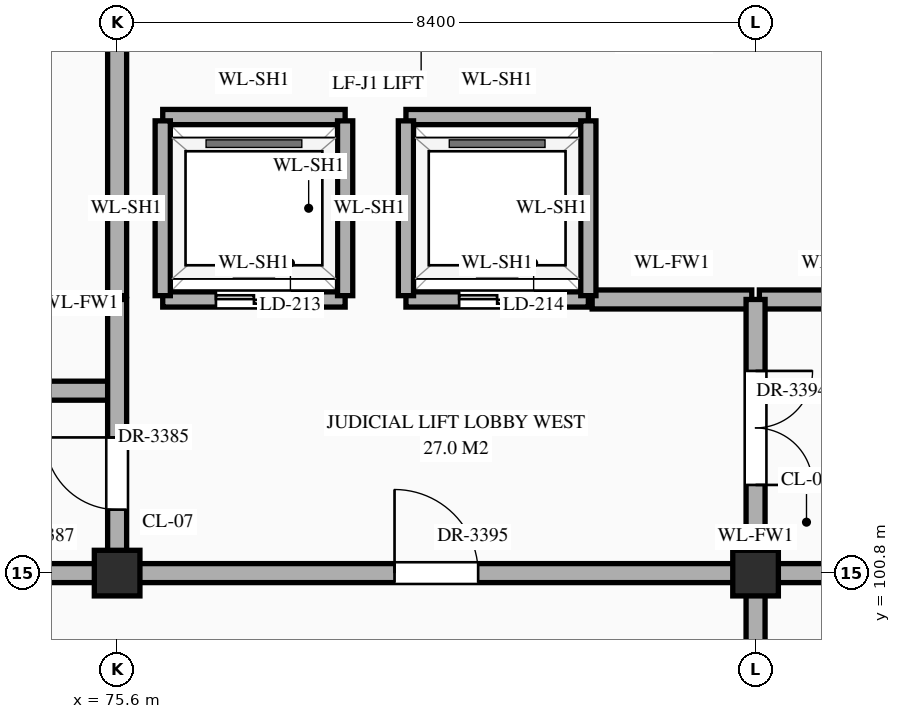
"""IFC4 building model, lengths in metres.
Left out: names, types, materials, properties, quantities, classifications, styles, units other than length and angle.
Written with IfcOpenShell. Run it as: python <this file> out.ifc"""

import sys

from ifc_helpers import new_model, si_unit, direction, frame, frame_2d, origin, origin_2d, place, context, subcontext, project, spatial, rectangle, extrude, element, fill, save


model = new_model("IFC4")
c1 = context("Model", 3, precision=1e-05, world=origin(), true_north=direction((0.0, 1.0)))
c2 = subcontext(c1, "Body", "Model", "MODEL_VIEW")
j1 = project(units=[si_unit("LENGTHUNIT", "METRE"), si_unit("PLANEANGLEUNIT", "RADIAN")], contexts=[c1])
p1 = place(None, origin())
s1 = spatial("IfcSite", under=j1, at=p1, CompositionType="ELEMENT")
p2 = place(p1, origin())
s2 = spatial("IfcBuilding", under=s1, at=p2, CompositionType="ELEMENT")
p3 = place(p2, frame((0.0, 0.0, 68.7)))
s3 = spatial("IfcBuildingStorey", under=s2, at=p3, CompositionType="ELEMENT", Elevation=68.7)
for number, where, z_axis, x_axis in (
    (1, (75.6, 100.8, 0.0), (0.0, 0.0, 1.0), (1.0, 0.0, 0.0)),
    (2, (84.0, 100.8, 0.0), (0.0, 0.0, 1.0), (1.0, 0.0, 0.0)),
):
    element("IfcColumn", number, at=place(p3, frame(where, z_axis=z_axis, x_axis=x_axis)), inside=s3, PredefinedType="COLUMN", context=c2, shape_type="SweptSolid", body=[
        extrude(rectangle(XDim=0.6, YDim=0.6, at=origin_2d()), origin(), (0.0, 0.0, 1.0), 4.5),
    ])
p4 = place(p3, frame((72.8, 100.8, 0.0), z_axis=(0.0, 0.0, 1.0), x_axis=(1.0, 0.0, 0.0)))
e3 = element("IfcWall", 3, at=p4, inside=s3, PredefinedType="STANDARD", context=c2, shape_type="SweptSolid", body=[
    extrude(rectangle(XDim=22.4, YDim=0.25, at=frame_2d((11.2, 0.0))), origin(), (0.0, 0.0, 1.0), 3.27),
])
p5 = place(p4, frame((0.79, 0.0, 0.0)))
e4 = element("IfcOpeningElement", 4, at=p5, cuts=e3, PredefinedType="OPENING", context=c2, shape_type="SweptSolid", body=[
    extrude(rectangle(XDim=1.0, YDim=2.2, at=frame_2d((0.5, 1.1))), frame((0.0, 0.137, 0.0), z_axis=(0.0, -1.0, 0.0), x_axis=(1.0, 0.0, 0.0)), (0.0, 0.0, 1.0), 0.274),
])
p6 = place(p4, frame((20.635, 0.0, 0.0)))
e5 = element("IfcOpeningElement", 5, at=p6, cuts=e3, PredefinedType="OPENING", context=c2, shape_type="SweptSolid", body=[
    extrude(rectangle(XDim=0.95, YDim=2.15, at=frame_2d((0.475, 1.075))), frame((0.0, 0.137, 0.0), z_axis=(0.0, -1.0, 0.0), x_axis=(1.0, 0.0, 0.0)), (0.0, 0.0, 1.0), 0.274),
])
p7 = place(p4, frame((6.45, 0.0, 0.0)))
e6 = element("IfcOpeningElement", 6, at=p7, cuts=e3, PredefinedType="OPENING", context=c2, shape_type="SweptSolid", body=[
    extrude(rectangle(XDim=1.1, YDim=2.2, at=frame_2d((0.55, 1.1))), frame((0.0, 0.137, 0.0), z_axis=(0.0, -1.0, 0.0), x_axis=(1.0, 0.0, 0.0)), (0.0, 0.0, 1.0), 0.274),
])
p8 = place(p4, frame((14.9, 0.0, 0.0)))
e7 = element("IfcOpeningElement", 7, at=p8, cuts=e3, PredefinedType="OPENING", context=c2, shape_type="SweptSolid", body=[
    extrude(rectangle(XDim=1.0, YDim=2.2, at=frame_2d((0.5, 1.1))), frame((0.0, 0.137, 0.0), z_axis=(0.0, -1.0, 0.0), x_axis=(1.0, 0.0, 0.0)), (0.0, 0.0, 1.0), 0.274),
])
p9 = place(p3, frame((71.4, 103.2, 0.0), z_axis=(0.0, 0.0, 1.0), x_axis=(1.0, 0.0, 0.0)))
e8 = element("IfcWall", 8, at=p9, inside=s3, PredefinedType="STANDARD", context=c2, shape_type="SweptSolid", body=[
    extrude(rectangle(XDim=4.2, YDim=0.25, at=frame_2d((2.1, 0.0))), origin(), (0.0, 0.0, 1.0), 4.12),
])
p10 = place(p9, frame((1.6, 0.0, 0.0)))
e9 = element("IfcOpeningElement", 9, at=p10, cuts=e8, PredefinedType="OPENING", context=c2, shape_type="SweptSolid", body=[
    extrude(rectangle(XDim=1.0, YDim=2.2, at=frame_2d((0.5, 1.1))), frame((0.0, 0.137, 0.0), z_axis=(0.0, -1.0, 0.0), x_axis=(1.0, 0.0, 0.0)), (0.0, 0.0, 1.0), 0.274),
])
p11 = place(p3, frame((76.2, 104.4, 0.0), z_axis=(0.0, 0.0, 1.0), x_axis=(1.0, 0.0, 0.0)))
e10 = element("IfcWall", 10, at=p11, inside=s3, PredefinedType="STANDARD", context=c2, shape_type="SweptSolid", body=[
    extrude(rectangle(XDim=2.4, YDim=0.2, at=frame_2d((1.2, 0.0))), origin(), (0.0, 0.0, 1.0), 4.12),
])
p12 = place(p11, frame((0.7, 0.0, 0.0)))
e11 = element("IfcOpeningElement", 11, at=p12, cuts=e10, PredefinedType="OPENING", context=c2, shape_type="SweptSolid", body=[
    extrude(rectangle(XDim=1.0, YDim=2.15, at=frame_2d((0.5, 1.075))), frame((0.0, 0.112, 0.0), z_axis=(0.0, -1.0, 0.0), x_axis=(1.0, 0.0, 0.0)), (0.0, 0.0, 1.0), 0.224),
])
p13 = place(p3, frame((79.4, 104.4, 0.0), z_axis=(0.0, 0.0, 1.0), x_axis=(1.0, 0.0, 0.0)))
e12 = element("IfcWall", 12, at=p13, inside=s3, PredefinedType="STANDARD", context=c2, shape_type="SweptSolid", body=[
    extrude(rectangle(XDim=2.4, YDim=0.2, at=frame_2d((1.2, 0.0))), origin(), (0.0, 0.0, 1.0), 4.12),
])
p14 = place(p13, frame((0.7, 0.0, 0.0)))
e13 = element("IfcOpeningElement", 13, at=p14, cuts=e12, PredefinedType="OPENING", context=c2, shape_type="SweptSolid", body=[
    extrude(rectangle(XDim=1.0, YDim=2.15, at=frame_2d((0.5, 1.075))), frame((0.0, 0.112, 0.0), z_axis=(0.0, -1.0, 0.0), x_axis=(1.0, 0.0, 0.0)), (0.0, 0.0, 1.0), 0.224),
])
for number, where, z_axis, x_axis in (
    (14, (81.85, 104.4, 0.0), (0.0, 0.0, 1.0), (1.0, 0.0, 0.0)),
    (15, (84.05, 104.4, 0.0), (0.0, 0.0, 1.0), (1.0, 0.0, 0.0)),
):
    element("IfcWall", number, at=place(p3, frame(where, z_axis=z_axis, x_axis=x_axis)), inside=s3, PredefinedType="STANDARD", context=c2, shape_type="SweptSolid", body=[
        extrude(rectangle(XDim=2.1, YDim=0.25, at=frame_2d((1.05, 0.0))), origin(), (0.0, 0.0, 1.0), 4.12),
    ])
for number, where, z_axis, x_axis in (
    (16, (76.2, 106.8, 0.0), (0.0, 0.0, 1.0), (1.0, 0.0, 0.0)),
    (17, (79.4, 106.8, 0.0), (0.0, 0.0, 1.0), (1.0, 0.0, 0.0)),
):
    element("IfcWall", number, at=place(p3, frame(where, z_axis=z_axis, x_axis=x_axis)), inside=s3, PredefinedType="STANDARD", context=c2, shape_type="SweptSolid", body=[
        extrude(rectangle(XDim=2.4, YDim=0.2, at=frame_2d((1.2, 0.0))), origin(), (0.0, 0.0, 1.0), 4.12),
    ])
p15 = place(p3, frame((75.6, 100.8, 0.0), z_axis=(0.0, 0.0, 1.0), x_axis=(0.0, 1.0, 0.0)))
e18 = element("IfcWall", 18, at=p15, inside=s3, PredefinedType="STANDARD", context=c2, shape_type="SweptSolid", body=[
    extrude(rectangle(XDim=3.6, YDim=0.25, at=frame_2d((1.8, 0.0))), origin(), (0.0, 0.0, 1.0), 3.37),
])
p16 = place(p15, frame((0.835, 0.0, 0.0)))
e19 = element("IfcOpeningElement", 19, at=p16, cuts=e18, PredefinedType="OPENING", context=c2, shape_type="SweptSolid", body=[
    extrude(rectangle(XDim=0.95, YDim=2.15, at=frame_2d((0.475, 1.075))), frame((0.0, 0.137, 0.0), z_axis=(0.0, -1.0, 0.0), x_axis=(1.0, 0.0, 0.0)), (0.0, 0.0, 1.0), 0.274),
])
p17 = place(p3, frame((75.6, 104.45, 0.0), z_axis=(0.0, 0.0, 1.0), x_axis=(0.0, 1.0, 0.0)))
e20 = element("IfcWall", 20, at=p17, inside=s3, PredefinedType="STANDARD", context=c2, shape_type="SweptSolid", body=[
    extrude(rectangle(XDim=3.46, YDim=0.25, at=frame_2d((1.73, 0.0))), origin(), (0.0, 0.0, 1.0), 3.37),
])
for number, where, z_axis, x_axis in (
    (21, (76.2, 104.45, 0.0), (0.0, 0.0, 1.0), (0.0, 1.0, 0.0)),
    (22, (78.6, 104.45, 0.0), (0.0, 0.0, 1.0), (0.0, 1.0, 0.0)),
    (23, (79.4, 104.45, 0.0), (0.0, 0.0, 1.0), (0.0, 1.0, 0.0)),
    (24, (81.8, 104.45, 0.0), (0.0, 0.0, 1.0), (0.0, 1.0, 0.0)),
):
    element("IfcWall", number, at=place(p3, frame(where, z_axis=z_axis, x_axis=x_axis)), inside=s3, PredefinedType="STANDARD", context=c2, shape_type="SweptSolid", body=[
        extrude(rectangle(XDim=2.3, YDim=0.2, at=frame_2d((1.15, 0.0))), origin(), (0.0, 0.0, 1.0), 4.12),
    ])
p18 = place(p3, frame((84.0, 86.44, 0.0), z_axis=(0.0, 0.0, 1.0), x_axis=(0.0, 1.0, 0.0)))
e25 = element("IfcWall", 25, at=p18, inside=s3, PredefinedType="STANDARD", context=c2, shape_type="SweptSolid", body=[
    extrude(rectangle(XDim=17.96, YDim=0.25, at=frame_2d((8.98, 0.0))), origin(), (0.0, 0.0, 1.0), 3.37),
])
p19 = place(p18, frame((15.52, 0.0, 0.0)))
e26 = element("IfcOpeningElement", 26, at=p19, cuts=e25, PredefinedType="OPENING", context=c2, shape_type="SweptSolid", body=[
    extrude(rectangle(XDim=1.5, YDim=2.25, at=frame_2d((0.75, 1.125))), frame((0.0, 0.137, 0.0), z_axis=(0.0, -1.0, 0.0), x_axis=(1.0, 0.0, 0.0)), (0.0, 0.0, 1.0), 0.274),
])
p20 = place(p18, frame((5.35, 0.0, 0.0)))
e27 = element("IfcOpeningElement", 27, at=p20, cuts=e25, PredefinedType="OPENING", context=c2, shape_type="SweptSolid", body=[
    extrude(rectangle(XDim=1.0, YDim=2.2, at=frame_2d((0.5, 1.1))), frame((0.0, 0.137, 0.0), z_axis=(0.0, -1.0, 0.0), x_axis=(1.0, 0.0, 0.0)), (0.0, 0.0, 1.0), 0.274),
])
p21 = place(p18, frame((7.995, 0.0, 0.0)))
e28 = element("IfcOpeningElement", 28, at=p21, cuts=e25, PredefinedType="OPENING", context=c2, shape_type="SweptSolid", body=[
    extrude(rectangle(XDim=0.95, YDim=2.15, at=frame_2d((0.475, 1.075))), frame((0.0, 0.137, 0.0), z_axis=(0.0, -1.0, 0.0), x_axis=(1.0, 0.0, 0.0)), (0.0, 0.0, 1.0), 0.274),
])
p22 = place(p12, origin())
e29 = element("IfcDoor", 29, at=p22, inside=s3, OperationType="DOUBLE_DOOR_SLIDING", PredefinedType="DOOR", context=c2, shape_type="SweptSolid", body=[
    extrude(rectangle(XDim=1.0, YDim=2.15, at=frame_2d((0.5, 1.075))), frame((0.0, 0.025, 0.0), z_axis=(0.0, -1.0, 0.0), x_axis=(1.0, 0.0, 0.0)), (0.0, 0.0, 1.0), 0.05),
])
fill(e11, e29)
p23 = place(p14, origin())
e30 = element("IfcDoor", 30, at=p23, inside=s3, OperationType="DOUBLE_DOOR_SLIDING", PredefinedType="DOOR", context=c2, shape_type="SweptSolid", body=[
    extrude(rectangle(XDim=1.0, YDim=2.15, at=frame_2d((0.5, 1.075))), frame((0.0, 0.025, 0.0), z_axis=(0.0, -1.0, 0.0), x_axis=(1.0, 0.0, 0.0)), (0.0, 0.0, 1.0), 0.05),
])
fill(e13, e30)
p24 = place(p16, origin())
e31 = element("IfcDoor", 31, at=p24, inside=s3, OperationType="SINGLE_SWING_RIGHT", PredefinedType="DOOR", context=c2, shape_type="SweptSolid", body=[
    extrude(rectangle(XDim=0.95, YDim=2.15, at=frame_2d((0.475, 1.075))), frame((0.0, 0.025, 0.0), z_axis=(0.0, -1.0, 0.0), x_axis=(1.0, 0.0, 0.0)), (0.0, 0.0, 1.0), 0.05),
])
fill(e19, e31)
p25 = place(p19, frame((1.5, 0.0, 0.0), z_axis=(0.0, 0.0, 1.0), x_axis=(-1.0, 0.0, 0.0)))
e32 = element("IfcDoor", 32, at=p25, inside=s3, OperationType="DOUBLE_DOOR_SINGLE_SWING", PredefinedType="DOOR", context=c2, shape_type="SweptSolid", body=[
    extrude(rectangle(XDim=1.5, YDim=2.25, at=frame_2d((0.75, 1.125))), frame((0.0, 0.025, 0.0), z_axis=(0.0, -1.0, 0.0), x_axis=(1.0, 0.0, 0.0)), (0.0, 0.0, 1.0), 0.05),
])
fill(e26, e32)
p26 = place(p7, origin())
e33 = element("IfcDoor", 33, at=p26, inside=s3, OperationType="SINGLE_SWING_LEFT", PredefinedType="DOOR", context=c2, shape_type="SweptSolid", body=[
    extrude(rectangle(XDim=1.1, YDim=2.2, at=frame_2d((0.55, 1.1))), frame((0.0, 0.025, 0.0), z_axis=(0.0, -1.0, 0.0), x_axis=(1.0, 0.0, 0.0)), (0.0, 0.0, 1.0), 0.05),
])
fill(e6, e33)
save(model, sys.argv[1])
